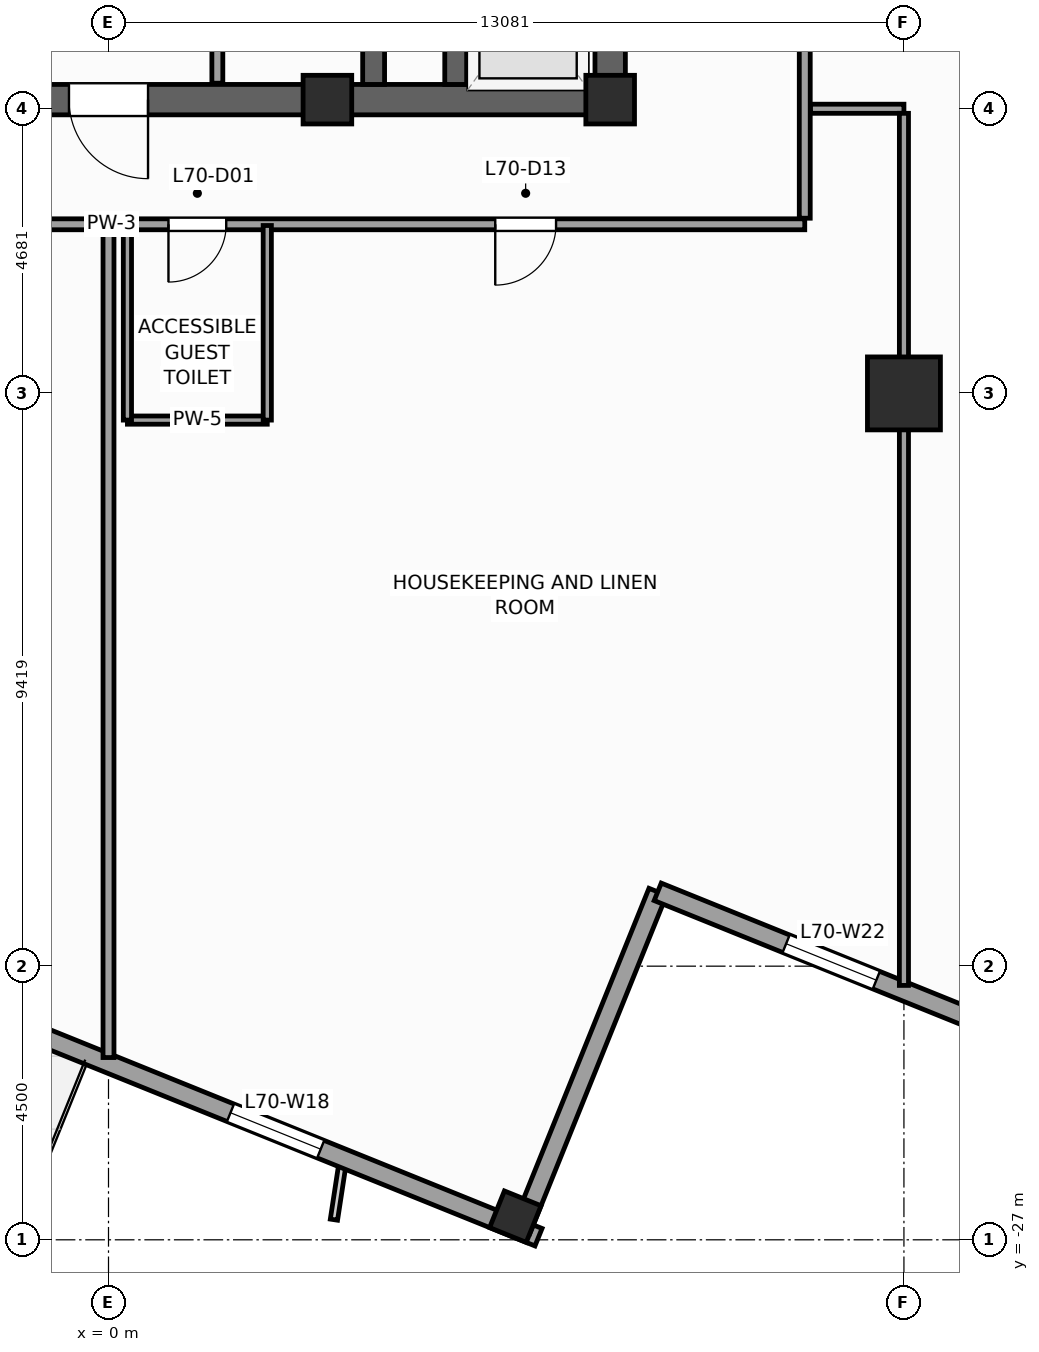
"""IFC4 building model, lengths in metres.
Left out: names, types, materials, properties, quantities, classifications, styles, units other than length and angle.
Written with IfcOpenShell. Run it as: python <this file> out.ifc"""

import sys

from ifc_helpers import new_model, si_unit, direction, frame, frame_2d, origin, origin_2d, place, context, subcontext, project, spatial, rectangle, extrude, source, transform, mapped, element, fill, save


model = new_model("IFC4")
c1 = context("Model", 3, precision=1e-05, world=origin(), true_north=direction((0.0, 1.0)))
c2 = subcontext(c1, "Body", "Model", "MODEL_VIEW")
j1 = project(units=[si_unit("LENGTHUNIT", "METRE"), si_unit("PLANEANGLEUNIT", "RADIAN")], contexts=[c1])
p1 = place(None, origin())
s1 = spatial("IfcSite", under=j1, at=p1, CompositionType="ELEMENT")
p2 = place(p1, origin())
s2 = spatial("IfcBuilding", under=s1, at=p2, CompositionType="ELEMENT")
p3 = place(p2, frame((0.0, 0.0, 286.8)))
s3 = spatial("IfcBuildingStorey", under=s2, at=p3, CompositionType="ELEMENT", Elevation=286.8)
p4 = place(p3, frame((-8.5, -8.25, 0.0), z_axis=(0.0, 0.0, 1.0), x_axis=(1.0, 0.0, 0.0)))
e1 = element("IfcWall", 1, at=p4, inside=s3, PredefinedType="SHEAR", context=c2, shape_type="SweptSolid", body=[
    extrude(rectangle(XDim=17.0, YDim=0.5, at=frame_2d((8.5, 0.0))), origin(), (0.0, 0.0, 1.0), 3.6),
])
p5 = place(p4, frame((7.85, 0.0, 0.0)))
e2 = element("IfcOpeningElement", 2, at=p5, cuts=e1, PredefinedType="OPENING", context=c2, shape_type="SweptSolid", body=[
    extrude(rectangle(XDim=1.3, YDim=2.2, at=frame_2d((0.65, 1.1))), frame((0.0, 0.26, 0.0), z_axis=(0.0, -1.0, 0.0), x_axis=(1.0, 0.0, 0.0)), (0.0, 0.0, 1.0), 0.52),
])
p6 = place(p3, frame((8.25, -8.0, 0.0), z_axis=(0.0, 0.0, 1.0), x_axis=(0.0, 1.0, 0.0)))
e3 = element("IfcWall", 3, at=p6, inside=s3, PredefinedType="SHEAR", context=c2, shape_type="SweptSolid", body=[
    extrude(rectangle(XDim=16.0, YDim=0.5, at=frame_2d((8.0, 0.0))), origin(), (0.0, 0.0, 1.0), 3.6),
])
p7 = place(p6, frame((4.69, 0.0, 0.0)))
e4 = element("IfcOpeningElement", 4, at=p7, cuts=e3, PredefinedType="OPENING", context=c2, shape_type="SweptSolid", body=[
    extrude(rectangle(XDim=1.3, YDim=2.2, at=frame_2d((0.65, 1.1))), frame((0.0, 0.26, 0.0), z_axis=(0.0, -1.0, 0.0), x_axis=(1.0, 0.0, 0.0)), (0.0, 0.0, 1.0), 0.52),
])
p8 = place(p3, frame((4.36, -8.0, 0.0), z_axis=(0.0, 0.0, 1.0), x_axis=(0.0, 1.0, 0.0)))
e5 = element("IfcWall", 5, at=p8, inside=s3, PredefinedType="SHEAR", context=c2, shape_type="SweptSolid", body=[
    extrude(rectangle(XDim=16.0, YDim=0.36, at=frame_2d((8.0, 0.0))), origin(), (0.0, 0.0, 1.0), 3.6),
])
p9 = place(p3, frame((5.71, -8.0, 0.0), z_axis=(0.0, 0.0, 1.0), x_axis=(0.0, 1.0, 0.0)))
e6 = element("IfcWall", 6, at=p9, inside=s3, PredefinedType="SHEAR", context=c2, shape_type="SweptSolid", body=[
    extrude(rectangle(XDim=2.54, YDim=0.36, at=frame_2d((1.27, 0.0))), origin(), (0.0, 0.0, 1.0), 3.6),
])
m1 = source(origin(), c2, "Body", "SweptSolid", [
    extrude(rectangle(XDim=0.8, YDim=0.8, at=origin_2d()), origin(), (0.0, 0.0, 1.0), 3.6),
])
for number, where, z_axis, x_axis in (
    (7, (8.25, -8.25, 0.0), (0.0, 0.0, 1.0), (1.0, 0.0, 0.0)),
    (8, (3.6, -8.25, 0.0), (0.0, 0.0, 1.0), (1.0, 0.0, 0.0)),
):
    element("IfcColumn", number, at=place(p3, frame(where, z_axis=z_axis, x_axis=x_axis)), inside=s3, PredefinedType="PILASTER", context=c2, shape_type="MappedRepresentation", body=[
        mapped(m1, transform((0.0, 0.0, 0.0), scale=1.0)),
    ])
m2 = source(origin(), c2, "Body", "SweptSolid", [
    extrude(rectangle(XDim=1.2, YDim=1.2, at=origin_2d()), origin(), (0.0, 0.0, 1.0), 3.6),
])
p10 = place(p3, frame((13.081, -13.081, 0.0), z_axis=(0.0, 0.0, 1.0), x_axis=(1.0, 0.0, 0.0)))
e9 = element("IfcColumn", 9, at=p10, inside=s3, PredefinedType="COLUMN", context=c2, shape_type="MappedRepresentation", body=[
    mapped(m2, transform((0.0, 0.0, 0.0), scale=1.0)),
])
m3 = source(origin(), c2, "Body", "SweptSolid", [
    extrude(rectangle(XDim=0.65, YDim=0.65, at=origin_2d()), origin(), (0.0, 0.0, 1.0), 3.6),
])
p11 = place(p3, frame((6.69, -26.62, 0.0), z_axis=(0.0, 0.0, 1.0), x_axis=(0.374606593416, 0.927183854567, 0.0)))
e10 = element("IfcColumn", 10, at=p11, inside=s3, PredefinedType="COLUMN", context=c2, shape_type="MappedRepresentation", body=[
    mapped(m3, transform((0.0, 0.0, 0.0), scale=1.0)),
])
p12 = place(p3, frame((-23.813, -14.479, 0.0), z_axis=(0.0, 0.0, 1.0), x_axis=(0.927182657188, -0.374609557019, 0.0)))
e11 = element("IfcWall", 11, at=p12, inside=s3, PredefinedType="STANDARD", context=c2, shape_type="SweptSolid", body=[
    extrude(rectangle(XDim=33.31, YDim=0.31, at=frame_2d((16.655, 0.0))), origin(), (0.0, 0.0, 1.0), 2.75),
])
p13 = place(p12, frame((21.73, 0.0, 0.0)))
e12 = element("IfcOpeningElement", 12, at=p13, cuts=e11, PredefinedType="OPENING", context=c2, shape_type="SweptSolid", body=[
    extrude(rectangle(XDim=1.05, YDim=2.25, at=frame_2d((0.525, 1.125))), frame((0.0, 0.165, 0.0), z_axis=(0.0, -1.0, 0.0), x_axis=(1.0, 0.0, 0.0)), (0.0, 0.0, 1.0), 0.33),
])
p14 = place(p12, frame((3.197, 0.0, 0.47)))
e13 = element("IfcOpeningElement", 13, at=p14, cuts=e11, PredefinedType="OPENING", context=c2, shape_type="SweptSolid", body=[
    extrude(rectangle(XDim=1.6, YDim=2.1, at=frame_2d((0.8, 1.05))), frame((0.0, 0.165, 0.0), z_axis=(0.0, -1.0, 0.0), x_axis=(1.0, 0.0, 0.0)), (0.0, 0.0, 1.0), 0.33),
])
p15 = place(p12, frame((8.86, 0.0, 0.47)))
e14 = element("IfcOpeningElement", 14, at=p15, cuts=e11, PredefinedType="OPENING", context=c2, shape_type="SweptSolid", body=[
    extrude(rectangle(XDim=1.6, YDim=2.1, at=frame_2d((0.8, 1.05))), frame((0.0, 0.165, 0.0), z_axis=(0.0, -1.0, 0.0), x_axis=(1.0, 0.0, 0.0)), (0.0, 0.0, 1.0), 0.33),
])
p16 = place(p12, frame((14.439, 0.0, 0.47)))
e15 = element("IfcOpeningElement", 15, at=p16, cuts=e11, PredefinedType="OPENING", context=c2, shape_type="SweptSolid", body=[
    extrude(rectangle(XDim=1.6, YDim=2.1, at=frame_2d((0.8, 1.05))), frame((0.0, 0.165, 0.0), z_axis=(0.0, -1.0, 0.0), x_axis=(1.0, 0.0, 0.0)), (0.0, 0.0, 1.0), 0.33),
])
p17 = place(p12, frame((27.847, 0.0, 0.47)))
e16 = element("IfcOpeningElement", 16, at=p17, cuts=e11, PredefinedType="OPENING", context=c2, shape_type="SweptSolid", body=[
    extrude(rectangle(XDim=1.6, YDim=2.1, at=frame_2d((0.8, 1.05))), frame((0.0, 0.165, 0.0), z_axis=(0.0, -1.0, 0.0), x_axis=(1.0, 0.0, 0.0)), (0.0, 0.0, 1.0), 0.33),
])
p18 = place(p3, frame((6.784, -26.841, 0.0), z_axis=(0.0, 0.0, 1.0), x_axis=(0.374636620962, 0.927171722085, 0.0)))
e17 = element("IfcWall", 17, at=p18, inside=s3, PredefinedType="STANDARD", context=c2, shape_type="SweptSolid", body=[
    extrude(rectangle(XDim=6.0, YDim=0.31, at=frame_2d((3.0, 0.0))), origin(), (0.0, 0.0, 1.0), 2.65),
])
p19 = place(p3, frame((9.032, -21.278, 0.0), z_axis=(0.0, 0.0, 1.0), x_axis=(0.927185411764, -0.374602739196, 0.0)))
e18 = element("IfcWall", 18, at=p19, inside=s3, PredefinedType="STANDARD", context=c2, shape_type="SweptSolid", body=[
    extrude(rectangle(XDim=6.155, YDim=0.31, at=frame_2d((3.078, 0.0))), origin(), (0.0, 0.0, 1.0), 3.35),
])
p20 = place(p19, frame((2.278, 0.0, 0.47)))
e19 = element("IfcOpeningElement", 19, at=p20, cuts=e18, PredefinedType="OPENING", context=c2, shape_type="SweptSolid", body=[
    extrude(rectangle(XDim=1.6, YDim=2.1, at=frame_2d((0.8, 1.05))), frame((0.0, 0.165, 0.0), z_axis=(0.0, -1.0, 0.0), x_axis=(1.0, 0.0, 0.0)), (0.0, 0.0, 1.0), 0.33),
])
p21 = place(p3, frame((1.79, -7.98, 0.0), z_axis=(0.0, 0.0, 1.0), x_axis=(0.0, 1.0, 0.0)))
e20 = element("IfcWall", 20, at=p21, inside=s3, PredefinedType="PARTITIONING", context=c2, shape_type="SweptSolid", body=[
    extrude(rectangle(XDim=12.38, YDim=0.18, at=frame_2d((6.19, 0.0))), origin(), (0.0, 0.0, 1.0), 3.35),
])
p22 = place(p21, frame((8.8, 0.0, 0.0)))
e21 = element("IfcOpeningElement", 21, at=p22, cuts=e20, PredefinedType="OPENING", context=c2, shape_type="SweptSolid", body=[
    extrude(rectangle(XDim=1.1, YDim=2.2, at=frame_2d((0.55, 1.1))), frame((0.0, 0.1, 0.0), z_axis=(0.0, -1.0, 0.0), x_axis=(1.0, 0.0, 0.0)), (0.0, 0.0, 1.0), 0.2),
])
p23 = place(p21, frame((10.86, 0.0, 0.0)))
e22 = element("IfcOpeningElement", 22, at=p23, cuts=e20, PredefinedType="OPENING", context=c2, shape_type="SweptSolid", body=[
    extrude(rectangle(XDim=1.1, YDim=2.2, at=frame_2d((0.55, 1.1))), frame((0.0, 0.1, 0.0), z_axis=(0.0, -1.0, 0.0), x_axis=(1.0, 0.0, 0.0)), (0.0, 0.0, 1.0), 0.2),
])
p24 = place(p21, frame((3.5, 0.0, 0.0)))
e23 = element("IfcOpeningElement", 23, at=p24, cuts=e20, PredefinedType="OPENING", context=c2, shape_type="SweptSolid", body=[
    extrude(rectangle(XDim=1.15, YDim=2.25, at=frame_2d((0.575, 1.125))), frame((0.0, 0.1, 0.0), z_axis=(0.0, -1.0, 0.0), x_axis=(1.0, 0.0, 0.0)), (0.0, 0.0, 1.0), 0.2),
])
p25 = place(p3, frame((-11.35, -10.3, 0.0), z_axis=(0.0, 0.0, 1.0), x_axis=(1.0, 0.0, 0.0)))
e24 = element("IfcWall", 24, at=p25, inside=s3, PredefinedType="PARTITIONING", context=c2, shape_type="SweptSolid", body=[
    extrude(rectangle(XDim=22.8, YDim=0.18, at=frame_2d((11.4, 0.0))), origin(), (0.0, 0.0, 1.0), 3.35),
])
p26 = place(p25, frame((12.336, 0.0, 0.0)))
e25 = element("IfcOpeningElement", 25, at=p26, cuts=e24, PredefinedType="OPENING", context=c2, shape_type="SweptSolid", body=[
    extrude(rectangle(XDim=0.95, YDim=2.1, at=frame_2d((0.475, 1.05))), frame((0.0, 0.1, 0.0), z_axis=(0.0, -1.0, 0.0), x_axis=(1.0, 0.0, 0.0)), (0.0, 0.0, 1.0), 0.2),
])
p27 = place(p25, frame((17.71, 0.0, 0.0)))
e26 = element("IfcOpeningElement", 26, at=p27, cuts=e24, PredefinedType="OPENING", context=c2, shape_type="SweptSolid", body=[
    extrude(rectangle(XDim=1.0, YDim=2.15, at=frame_2d((0.5, 1.075))), frame((0.0, 0.1, 0.0), z_axis=(0.0, -1.0, 0.0), x_axis=(1.0, 0.0, 0.0)), (0.0, 0.0, 1.0), 0.2),
])
p28 = place(p25, frame((5.339, 0.0, 0.0)))
e27 = element("IfcOpeningElement", 27, at=p28, cuts=e24, PredefinedType="OPENING", context=c2, shape_type="SweptSolid", body=[
    extrude(rectangle(XDim=1.0, YDim=2.15, at=frame_2d((0.5, 1.075))), frame((0.0, 0.1, 0.0), z_axis=(0.0, -1.0, 0.0), x_axis=(1.0, 0.0, 0.0)), (0.0, 0.0, 1.0), 0.2),
])
p29 = place(p3, frame((11.45, -10.2, 0.0), z_axis=(0.0, 0.0, 1.0), x_axis=(0.0, 1.0, 0.0)))
e28 = element("IfcWall", 28, at=p29, inside=s3, PredefinedType="PARTITIONING", context=c2, shape_type="SweptSolid", body=[
    extrude(rectangle(XDim=22.55, YDim=0.18, at=frame_2d((11.275, 0.0))), origin(), (0.0, 0.0, 1.0), 3.35),
])
p30 = place(p29, frame((13.9, 0.0, 0.0)))
e29 = element("IfcOpeningElement", 29, at=p30, cuts=e28, PredefinedType="OPENING", context=c2, shape_type="SweptSolid", body=[
    extrude(rectangle(XDim=1.0, YDim=2.15, at=frame_2d((0.5, 1.075))), frame((0.0, 0.1, 0.0), z_axis=(0.0, -1.0, 0.0), x_axis=(1.0, 0.0, 0.0)), (0.0, 0.0, 1.0), 0.2),
])
p31 = place(p29, frame((5.5, 0.0, 0.0)))
e30 = element("IfcOpeningElement", 30, at=p31, cuts=e28, PredefinedType="OPENING", context=c2, shape_type="SweptSolid", body=[
    extrude(rectangle(XDim=1.0, YDim=2.15, at=frame_2d((0.5, 1.075))), frame((0.0, 0.1, 0.0), z_axis=(0.0, -1.0, 0.0), x_axis=(1.0, 0.0, 0.0)), (0.0, 0.0, 1.0), 0.2),
])
p32 = place(p3, frame((0.0, -10.395, 0.0), z_axis=(0.0, 0.0, 1.0), x_axis=(0.0, -1.0, 0.0)))
e31 = element("IfcWall", 31, at=p32, inside=s3, PredefinedType="PARTITIONING", context=c2, shape_type="SweptSolid", body=[
    extrude(rectangle(XDim=13.608, YDim=0.18, at=frame_2d((6.804, 0.0))), origin(), (0.0, 0.0, 1.0), 3.35),
])
p33 = place(p3, frame((11.545, -8.4, 0.0), z_axis=(0.0, 0.0, 1.0), x_axis=(1.0, 0.0, 0.0)))
e32 = element("IfcWall", 32, at=p33, inside=s3, PredefinedType="PARTITIONING", context=c2, shape_type="SweptSolid", body=[
    extrude(rectangle(XDim=1.536, YDim=0.15, at=frame_2d((0.768, 0.0))), origin(), (0.0, 0.0, 1.0), 3.35),
])
p34 = place(p3, frame((13.081, -8.475, 0.0), z_axis=(0.0, 0.0, 1.0), x_axis=(0.0, -1.0, 0.0)))
e33 = element("IfcWall", 33, at=p34, inside=s3, PredefinedType="PARTITIONING", context=c2, shape_type="SweptSolid", body=[
    extrude(rectangle(XDim=14.342, YDim=0.15, at=frame_2d((7.171, 0.0))), origin(), (0.0, 0.0, 1.0), 2.45),
])
p35 = place(p3, frame((0.311, -13.52, 0.0), z_axis=(0.0, 0.0, 1.0), x_axis=(1.0, 0.0, 0.0)))
e34 = element("IfcWall", 34, at=p35, inside=s3, PredefinedType="PARTITIONING", context=c2, shape_type="SweptSolid", body=[
    extrude(rectangle(XDim=2.3, YDim=0.135, at=frame_2d((1.15, 0.0))), origin(), (0.0, 0.0, 1.0), 3.35),
])
for number, where, z_axis, x_axis in (
    (35, (2.611, -13.52, 0.0), (0.0, 0.0, 1.0), (0.0, 1.0, 0.0)),
    (36, (0.311, -13.52, 0.0), (0.0, 0.0, 1.0), (0.0, 1.0, 0.0)),
):
    element("IfcWall", number, at=place(p3, frame(where, z_axis=z_axis, x_axis=x_axis)), inside=s3, PredefinedType="PARTITIONING", context=c2, shape_type="SweptSolid", body=[
        extrude(rectangle(XDim=3.2, YDim=0.135, at=frame_2d((1.6, 0.0))), origin(), (0.0, 0.0, 1.0), 3.35),
    ])
m4 = source(origin(), c2, "Body", "SweptSolid", [
    extrude(rectangle(XDim=1.6, YDim=2.1, at=frame_2d((0.8, 1.05))), frame((0.0, 0.03, 0.0), z_axis=(0.0, -1.0, 0.0), x_axis=(1.0, 0.0, 0.0)), (0.0, 0.0, 1.0), 0.06),
])
p36 = place(p17, origin())
e37 = element("IfcWindow", 37, at=p36, inside=s3, PartitioningType="SINGLE_PANEL", PredefinedType="WINDOW", context=c2, shape_type="MappedRepresentation", body=[
    mapped(m4, transform((0.0, 0.0, 0.0), scale=1.0)),
])
fill(e16, e37)
p37 = place(p20, origin())
e38 = element("IfcWindow", 38, at=p37, inside=s3, PartitioningType="SINGLE_PANEL", PredefinedType="WINDOW", context=c2, shape_type="MappedRepresentation", body=[
    mapped(m4, transform((0.0, 0.0, 0.0), scale=1.0)),
])
fill(e19, e38)
m5 = source(origin(), c2, "Body", "SweptSolid", [
    extrude(rectangle(XDim=1.3, YDim=2.2, at=frame_2d((0.65, 1.1))), frame((0.0, 0.025, 0.0), z_axis=(0.0, -1.0, 0.0), x_axis=(1.0, 0.0, 0.0)), (0.0, 0.0, 1.0), 0.05),
])
p38 = place(p5, frame((1.3, 0.0, 0.0), z_axis=(0.0, 0.0, 1.0), x_axis=(-1.0, 0.0, 0.0)))
e39 = element("IfcDoor", 39, at=p38, inside=s3, OperationType="SINGLE_SWING_RIGHT", PredefinedType="DOOR", context=c2, shape_type="MappedRepresentation", body=[
    mapped(m5, transform((0.0, 0.0, 0.0), scale=1.0)),
])
fill(e2, e39)
m6 = source(origin(), c2, "Body", "SweptSolid", [
    extrude(rectangle(XDim=0.95, YDim=2.1, at=frame_2d((0.475, 1.05))), frame((0.0, 0.025, 0.0), z_axis=(0.0, -1.0, 0.0), x_axis=(1.0, 0.0, 0.0)), (0.0, 0.0, 1.0), 0.05),
])
p39 = place(p26, frame((0.95, 0.0, 0.0), z_axis=(0.0, 0.0, 1.0), x_axis=(-1.0, 0.0, 0.0)))
e40 = element("IfcDoor", 40, at=p39, inside=s3, OperationType="SINGLE_SWING_LEFT", PredefinedType="DOOR", context=c2, shape_type="MappedRepresentation", body=[
    mapped(m6, transform((0.0, 0.0, 0.0), scale=1.0)),
])
fill(e25, e40)
m7 = source(origin(), c2, "Body", "SweptSolid", [
    extrude(rectangle(XDim=1.0, YDim=2.15, at=frame_2d((0.5, 1.075))), frame((0.0, 0.025, 0.0), z_axis=(0.0, -1.0, 0.0), x_axis=(1.0, 0.0, 0.0)), (0.0, 0.0, 1.0), 0.05),
])
p40 = place(p27, frame((1.0, 0.0, 0.0), z_axis=(0.0, 0.0, 1.0), x_axis=(-1.0, 0.0, 0.0)))
e41 = element("IfcDoor", 41, at=p40, inside=s3, OperationType="SINGLE_SWING_LEFT", PredefinedType="DOOR", context=c2, shape_type="MappedRepresentation", body=[
    mapped(m7, transform((0.0, 0.0, 0.0), scale=1.0)),
])
fill(e26, e41)
save(model, sys.argv[1])
